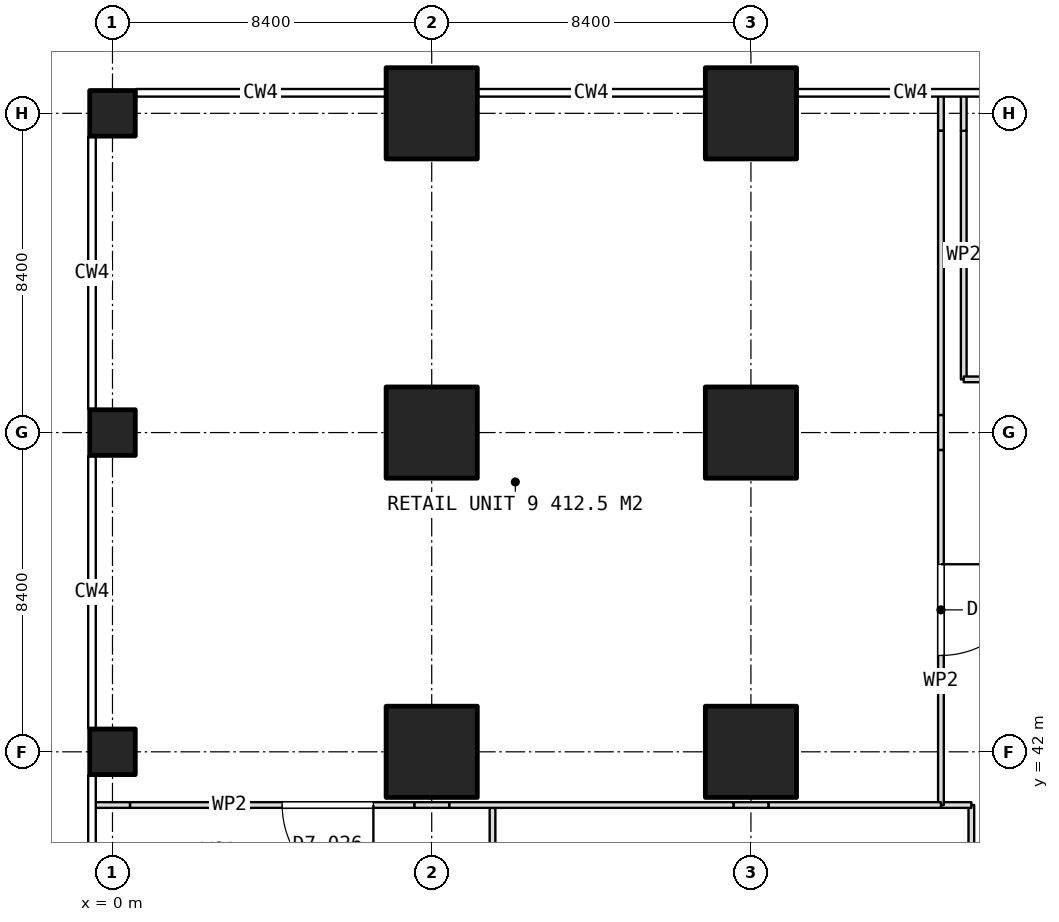
"""IFC4 building model, lengths in metres.
Left out: names, types, materials, properties, quantities, classifications, styles, units other than length and angle.
Written with IfcOpenShell. Run it as: python <this file> out.ifc"""

import sys

from ifc_helpers import new_model, si_unit, direction, frame, frame_2d, origin, origin_2d, place, context, subcontext, project, spatial, rectangle, extrude, element, fill, save


model = new_model("IFC4")
c1 = context("Model", 3, precision=1e-05, world=origin(), true_north=direction((0.0, 1.0)))
c2 = subcontext(c1, "Body", "Model", "MODEL_VIEW")
j1 = project(units=[si_unit("LENGTHUNIT", "METRE"), si_unit("PLANEANGLEUNIT", "RADIAN")], contexts=[c1])
p1 = place(None, origin())
s1 = spatial("IfcSite", under=j1, at=p1, CompositionType="ELEMENT")
p2 = place(p1, origin())
s2 = spatial("IfcBuilding", under=s1, at=p2, CompositionType="ELEMENT")
p3 = place(p2, frame((0.0, 0.0, 10.4)))
s3 = spatial("IfcBuildingStorey", under=s2, at=p3, CompositionType="ELEMENT", Elevation=10.4)
for number, where, z_axis, x_axis in (
    (1, (0.0, 42.0, 0.0), (0.0, 0.0, 1.0), (1.0, 0.0, 0.0)),
    (2, (0.0, 50.4, 0.0), (0.0, 0.0, 1.0), (1.0, 0.0, 0.0)),
    (3, (0.0, 58.8, 0.0), (0.0, 0.0, 1.0), (1.0, 0.0, 0.0)),
):
    element("IfcColumn", number, at=place(p3, frame(where, z_axis=z_axis, x_axis=x_axis)), inside=s3, PredefinedType="COLUMN", context=c2, shape_type="SweptSolid", body=[
        extrude(rectangle(XDim=1.2, YDim=1.2, at=origin_2d()), origin(), (0.0, 0.0, 1.0), 5.0),
    ])
for number, where, z_axis, x_axis in (
    (4, (8.4, 42.0, 0.0), (0.0, 0.0, 1.0), (1.0, 0.0, 0.0)),
    (5, (8.4, 50.4, 0.0), (0.0, 0.0, 1.0), (1.0, 0.0, 0.0)),
    (6, (8.4, 58.8, 0.0), (0.0, 0.0, 1.0), (1.0, 0.0, 0.0)),
    (7, (16.8, 42.0, 0.0), (0.0, 0.0, 1.0), (1.0, 0.0, 0.0)),
    (8, (16.8, 50.4, 0.0), (0.0, 0.0, 1.0), (1.0, 0.0, 0.0)),
    (9, (16.8, 58.8, 0.0), (0.0, 0.0, 1.0), (1.0, 0.0, 0.0)),
):
    element("IfcColumn", number, at=place(p3, frame(where, z_axis=z_axis, x_axis=x_axis)), inside=s3, PredefinedType="COLUMN", context=c2, shape_type="SweptSolid", body=[
        extrude(rectangle(XDim=2.4, YDim=2.4, at=origin_2d()), origin(), (0.0, 0.0, 1.0), 5.0),
    ])
p4 = place(p3, frame((21.8, 59.29, 0.0), z_axis=(0.0, 0.0, 1.0), x_axis=(0.0, -1.0, 0.0)))
e10 = element("IfcWall", 10, at=p4, inside=s3, PredefinedType="PARTITIONING", context=c2, shape_type="SweptSolid", body=[
    extrude(rectangle(XDim=0.95, YDim=0.15, at=frame_2d((0.475, 0.0))), origin(), (0.0, 0.0, 1.0), 2.9),
])
p5 = place(p3, frame((21.8, 58.34, 0.0), z_axis=(0.0, 0.0, 1.0), x_axis=(0.0, -1.0, 0.0)))
e11 = element("IfcWall", 11, at=p5, inside=s3, PredefinedType="PARTITIONING", context=c2, shape_type="SweptSolid", body=[
    extrude(rectangle(XDim=7.48, YDim=0.15, at=frame_2d((3.74, 0.0))), origin(), (0.0, 0.0, 1.0), 4.7),
])
p6 = place(p3, frame((21.8, 50.86, 0.0), z_axis=(0.0, 0.0, 1.0), x_axis=(0.0, -1.0, 0.0)))
e12 = element("IfcWall", 12, at=p6, inside=s3, PredefinedType="PARTITIONING", context=c2, shape_type="SweptSolid", body=[
    extrude(rectangle(XDim=0.92, YDim=0.15, at=frame_2d((0.46, 0.0))), origin(), (0.0, 0.0, 1.0), 2.9),
])
p7 = place(p3, frame((21.8, 49.94, 0.0), z_axis=(0.0, 0.0, 1.0), x_axis=(0.0, -1.0, 0.0)))
e13 = element("IfcWall", 13, at=p7, inside=s3, PredefinedType="PARTITIONING", context=c2, shape_type="SweptSolid", body=[
    extrude(rectangle(XDim=9.34, YDim=0.15, at=frame_2d((4.67, 0.0))), origin(), (0.0, 0.0, 1.0), 4.7),
])
p8 = place(p7, frame((3.005, 0.0, 0.0)))
e14 = element("IfcOpeningElement", 14, at=p8, cuts=e13, PredefinedType="OPENING", context=c2, shape_type="SweptSolid", body=[
    extrude(rectangle(XDim=2.4, YDim=2.4, at=frame_2d((1.2, 1.2))), frame((0.0, 0.085, 0.0), z_axis=(0.0, -1.0, 0.0), x_axis=(1.0, 0.0, 0.0)), (0.0, 0.0, 1.0), 0.17),
])
p9 = place(p3, frame((21.8, 40.6, 0.0), z_axis=(0.0, 0.0, 1.0), x_axis=(-1.0, 0.0, 0.0)))
e15 = element("IfcWall", 15, at=p9, inside=s3, PredefinedType="PARTITIONING", context=c2, shape_type="SweptSolid", body=[
    extrude(rectangle(XDim=4.54, YDim=0.15, at=frame_2d((2.27, 0.0))), origin(), (0.0, 0.0, 1.0), 4.7),
])
p10 = place(p3, frame((17.26, 40.6, 0.0), z_axis=(0.0, 0.0, 1.0), x_axis=(-1.0, 0.0, 0.0)))
e16 = element("IfcWall", 16, at=p10, inside=s3, PredefinedType="PARTITIONING", context=c2, shape_type="SweptSolid", body=[
    extrude(rectangle(XDim=0.92, YDim=0.15, at=frame_2d((0.46, 0.0))), origin(), (0.0, 0.0, 1.0), 2.9),
])
p11 = place(p3, frame((16.34, 40.6, 0.0), z_axis=(0.0, 0.0, 1.0), x_axis=(-1.0, 0.0, 0.0)))
e17 = element("IfcWall", 17, at=p11, inside=s3, PredefinedType="PARTITIONING", context=c2, shape_type="SweptSolid", body=[
    extrude(rectangle(XDim=7.48, YDim=0.15, at=frame_2d((3.74, 0.0))), origin(), (0.0, 0.0, 1.0), 4.7),
])
p12 = place(p3, frame((8.86, 40.6, 0.0), z_axis=(0.0, 0.0, 1.0), x_axis=(-1.0, 0.0, 0.0)))
e18 = element("IfcWall", 18, at=p12, inside=s3, PredefinedType="PARTITIONING", context=c2, shape_type="SweptSolid", body=[
    extrude(rectangle(XDim=0.92, YDim=0.15, at=frame_2d((0.46, 0.0))), origin(), (0.0, 0.0, 1.0), 2.9),
])
p13 = place(p3, frame((7.94, 40.6, 0.0), z_axis=(0.0, 0.0, 1.0), x_axis=(-1.0, 0.0, 0.0)))
e19 = element("IfcWall", 19, at=p13, inside=s3, PredefinedType="PARTITIONING", context=c2, shape_type="SweptSolid", body=[
    extrude(rectangle(XDim=7.48, YDim=0.15, at=frame_2d((3.74, 0.0))), origin(), (0.0, 0.0, 1.0), 4.7),
])
p14 = place(p13, frame((1.075, 0.0, 0.0)))
e20 = element("IfcOpeningElement", 20, at=p14, cuts=e19, PredefinedType="OPENING", context=c2, shape_type="SweptSolid", body=[
    extrude(rectangle(XDim=2.4, YDim=2.4, at=frame_2d((1.2, 1.2))), frame((0.0, 0.085, 0.0), z_axis=(0.0, -1.0, 0.0), x_axis=(1.0, 0.0, 0.0)), (0.0, 0.0, 1.0), 0.17),
])
p15 = place(p3, frame((0.46, 40.6, 0.0), z_axis=(0.0, 0.0, 1.0), x_axis=(-1.0, 0.0, 0.0)))
e21 = element("IfcWall", 21, at=p15, inside=s3, PredefinedType="PARTITIONING", context=c2, shape_type="SweptSolid", body=[
    extrude(rectangle(XDim=0.95, YDim=0.15, at=frame_2d((0.475, 0.0))), origin(), (0.0, 0.0, 1.0), 2.9),
])
p16 = place(p3, frame((24.74, 51.8, 0.0), z_axis=(0.0, 0.0, 1.0), x_axis=(-1.0, 0.0, 0.0)))
e22 = element("IfcWall", 22, at=p16, inside=s3, PredefinedType="PARTITIONING", context=c2, shape_type="SweptSolid", body=[
    extrude(rectangle(XDim=2.34, YDim=0.15, at=frame_2d((1.17, 0.0))), origin(), (0.0, 0.0, 1.0), 4.7),
])
p17 = place(p3, frame((22.4, 51.8, 0.0), z_axis=(0.0, 0.0, 1.0), x_axis=(0.0, 1.0, 0.0)))
e23 = element("IfcWall", 23, at=p17, inside=s3, PredefinedType="PARTITIONING", context=c2, shape_type="SweptSolid", body=[
    extrude(rectangle(XDim=6.54, YDim=0.15, at=frame_2d((3.27, 0.0))), origin(), (0.0, 0.0, 1.0), 4.7),
])
p18 = place(p3, frame((22.4, 58.34, 0.0), z_axis=(0.0, 0.0, 1.0), x_axis=(0.0, 1.0, 0.0)))
e24 = element("IfcWall", 24, at=p18, inside=s3, PredefinedType="PARTITIONING", context=c2, shape_type="SweptSolid", body=[
    extrude(rectangle(XDim=0.95, YDim=0.15, at=frame_2d((0.475, 0.0))), origin(), (0.0, 0.0, 1.0), 2.9),
])
p19 = place(p3, frame((22.6, 40.6, 0.0), z_axis=(0.0, 0.0, 1.0), x_axis=(0.0, -1.0, 0.0)))
e25 = element("IfcWall", 25, at=p19, inside=s3, PredefinedType="PARTITIONING", context=c2, shape_type="SweptSolid", body=[
    extrude(rectangle(XDim=9.8, YDim=0.15, at=frame_2d((4.9, 0.0))), origin(), (0.0, 0.0, 1.0), 4.7),
])
p20 = place(p19, frame((5.5, 0.0, 0.0)))
e26 = element("IfcOpeningElement", 26, at=p20, cuts=e25, PredefinedType="OPENING", context=c2, shape_type="SweptSolid", body=[
    extrude(rectangle(XDim=2.4, YDim=2.4, at=frame_2d((1.2, 1.2))), frame((0.0, 0.085, 0.0), z_axis=(0.0, -1.0, 0.0), x_axis=(1.0, 0.0, 0.0)), (0.0, 0.0, 1.0), 0.17),
])
p21 = place(p3, frame((10.0, 34.06, 0.0), z_axis=(0.0, 0.0, 1.0), x_axis=(0.0, 1.0, 0.0)))
e27 = element("IfcWall", 27, at=p21, inside=s3, PredefinedType="PARTITIONING", context=c2, shape_type="SweptSolid", body=[
    extrude(rectangle(XDim=6.465, YDim=0.15, at=frame_2d((3.232, 0.0))), origin(), (0.0, 0.0, 1.0), 4.7),
])
p22 = place(p3, frame((21.8, 40.6, 0.0), z_axis=(0.0, 0.0, 1.0), x_axis=(1.0, 0.0, 0.0)))
e28 = element("IfcWall", 28, at=p22, inside=s3, PredefinedType="PARTITIONING", context=c2, shape_type="SweptSolid", body=[
    extrude(rectangle(XDim=0.8, YDim=0.15, at=frame_2d((0.4, 0.0))), origin(), (0.0, 0.0, 1.0), 4.7),
])
p23 = place(p8, origin())
e29 = element("IfcDoor", 29, at=p23, inside=s3, OperationType="DOUBLE_DOOR_SINGLE_SWING", PredefinedType="DOOR", context=c2, shape_type="SweptSolid", body=[
    extrude(rectangle(XDim=2.4, YDim=2.4, at=frame_2d((1.2, 1.2))), frame((0.0, 0.025, 0.0), z_axis=(0.0, -1.0, 0.0), x_axis=(1.0, 0.0, 0.0)), (0.0, 0.0, 1.0), 0.05),
])
fill(e14, e29)
p24 = place(p14, origin())
e30 = element("IfcDoor", 30, at=p24, inside=s3, OperationType="DOUBLE_DOOR_SINGLE_SWING", PredefinedType="DOOR", context=c2, shape_type="SweptSolid", body=[
    extrude(rectangle(XDim=2.4, YDim=2.4, at=frame_2d((1.2, 1.2))), frame((0.0, 0.025, 0.0), z_axis=(0.0, -1.0, 0.0), x_axis=(1.0, 0.0, 0.0)), (0.0, 0.0, 1.0), 0.05),
])
fill(e20, e30)
save(model, sys.argv[1])
